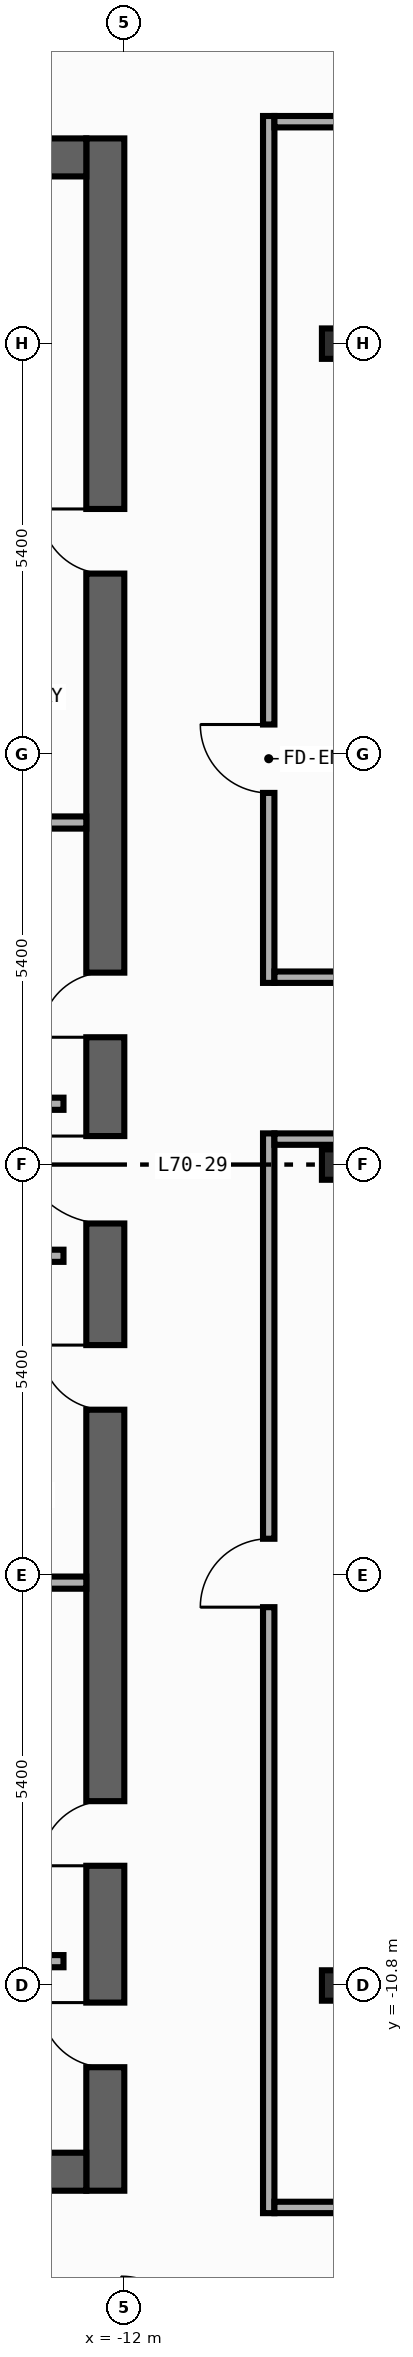
"""IFC4 building model, lengths in metres.
Left out: names, types, materials, properties, quantities, classifications, styles, units other than length and angle.
Written with IfcOpenShell. Run it as: python <this file> out.ifc"""

import sys

from ifc_helpers import new_model, si_unit, direction, frame, frame_2d, origin, origin_2d, place, context, subcontext, project, spatial, rectangle, i_section, extrude, element, fill, save


model = new_model("IFC4")
c1 = context("Model", 3, precision=1e-05, world=origin(), true_north=direction((0.0, 1.0)))
c2 = subcontext(c1, "Body", "Model", "MODEL_VIEW")
j1 = project(units=[si_unit("LENGTHUNIT", "METRE"), si_unit("PLANEANGLEUNIT", "RADIAN")], contexts=[c1])
p1 = place(None, origin())
s1 = spatial("IfcSite", under=j1, at=p1, CompositionType="ELEMENT")
p2 = place(p1, origin())
s2 = spatial("IfcBuilding", under=s1, at=p2, CompositionType="ELEMENT")
p3 = place(p2, frame((0.0, 0.0, 292.8)))
s3 = spatial("IfcBuildingStorey", under=s2, at=p3, CompositionType="ELEMENT", Elevation=292.8)
p4 = place(p3, frame((-12.25, -13.5, 0.0), z_axis=(0.0, 0.0, 1.0), x_axis=(0.0, 1.0, 0.0)))
e1 = element("IfcWall", 1, at=p4, inside=s3, PredefinedType="SHEAR", context=c2, shape_type="SweptSolid", body=[
    extrude(rectangle(XDim=27.0, YDim=0.5, at=frame_2d((13.5, 0.0))), origin(), (0.0, 0.0, 1.0), 3.54),
])
p5 = place(p4, frame((15.175, 0.0, 0.0)))
e2 = element("IfcOpeningElement", 2, at=p5, cuts=e1, PredefinedType="OPENING", context=c2, shape_type="SweptSolid", body=[
    extrude(rectangle(XDim=0.85, YDim=2.1, at=frame_2d((0.425, 1.05))), frame((0.0, 0.26, 0.0), z_axis=(0.0, -1.0, 0.0), x_axis=(1.0, 0.0, 0.0)), (0.0, 0.0, 1.0), 0.52),
])
p6 = place(p4, frame((21.275, 0.0, 0.0)))
e3 = element("IfcOpeningElement", 3, at=p6, cuts=e1, PredefinedType="OPENING", context=c2, shape_type="SweptSolid", body=[
    extrude(rectangle(XDim=0.85, YDim=2.1, at=frame_2d((0.425, 1.05))), frame((0.0, 0.26, 0.0), z_axis=(0.0, -1.0, 0.0), x_axis=(1.0, 0.0, 0.0)), (0.0, 0.0, 1.0), 0.52),
])
p7 = place(p4, frame((4.275, 0.0, 0.0)))
e4 = element("IfcOpeningElement", 4, at=p7, cuts=e1, PredefinedType="OPENING", context=c2, shape_type="SweptSolid", body=[
    extrude(rectangle(XDim=0.85, YDim=2.1, at=frame_2d((0.425, 1.05))), frame((0.0, 0.26, 0.0), z_axis=(0.0, -1.0, 0.0), x_axis=(1.0, 0.0, 0.0)), (0.0, 0.0, 1.0), 0.52),
])
p8 = place(p4, frame((10.275, 0.0, 0.0)))
e5 = element("IfcOpeningElement", 5, at=p8, cuts=e1, PredefinedType="OPENING", context=c2, shape_type="SweptSolid", body=[
    extrude(rectangle(XDim=0.85, YDim=2.1, at=frame_2d((0.425, 1.05))), frame((0.0, 0.26, 0.0), z_axis=(0.0, -1.0, 0.0), x_axis=(1.0, 0.0, 0.0)), (0.0, 0.0, 1.0), 0.52),
])
p9 = place(p4, frame((12.725, 0.0, 0.0)))
e6 = element("IfcOpeningElement", 6, at=p9, cuts=e1, PredefinedType="OPENING", context=c2, shape_type="SweptSolid", body=[
    extrude(rectangle(XDim=1.15, YDim=2.2, at=frame_2d((0.575, 1.1))), frame((0.0, 0.26, 0.0), z_axis=(0.0, -1.0, 0.0), x_axis=(1.0, 0.0, 0.0)), (0.0, 0.0, 1.0), 0.52),
])
p10 = place(p4, frame((1.625, 0.0, 0.0)))
e7 = element("IfcOpeningElement", 7, at=p10, cuts=e1, PredefinedType="OPENING", context=c2, shape_type="SweptSolid", body=[
    extrude(rectangle(XDim=0.85, YDim=2.1, at=frame_2d((0.425, 1.05))), frame((0.0, 0.26, 0.0), z_axis=(0.0, -1.0, 0.0), x_axis=(1.0, 0.0, 0.0)), (0.0, 0.0, 1.0), 0.52),
])
for number, where, z_axis, x_axis in (
    (8, (-19.9, -13.25, 0.0), (0.0, 0.0, 1.0), (1.0, 0.0, 0.0)),
    (9, (-19.9, 13.25, 0.0), (0.0, 0.0, 1.0), (1.0, 0.0, 0.0)),
):
    element("IfcWall", number, at=place(p3, frame(where, z_axis=z_axis, x_axis=x_axis)), inside=s3, PredefinedType="SHEAR", context=c2, shape_type="SweptSolid", body=[
        extrude(rectangle(XDim=7.4, YDim=0.5, at=frame_2d((3.7, 0.0))), origin(), (0.0, 0.0, 1.0), 3.54),
    ])
for number, where, z_axis, x_axis in (
    (10, (-9.2, -10.8, 0.0), (0.0, 0.0, 1.0), (1.0, 0.0, 0.0)),
    (11, (-9.2, 0.0, 0.0), (0.0, 0.0, 1.0), (1.0, 0.0, 0.0)),
    (12, (-9.2, 10.8, 0.0), (0.0, 0.0, 1.0), (1.0, 0.0, 0.0)),
):
    element("IfcColumn", number, at=place(p3, frame(where, z_axis=z_axis, x_axis=x_axis)), inside=s3, PredefinedType="COLUMN", context=c2, shape_type="SweptSolid", body=[
        extrude(i_section(OverallWidth=0.4, OverallDepth=0.4, WebThickness=0.013, FlangeThickness=0.021, FilletRadius=0.022, at=origin_2d()), origin(), (0.0, 0.0, 1.0), 3.8),
    ])
for number, where, z_axis, x_axis in (
    (13, (-15.4, 0.8, 0.0), (0.0, 0.0, 1.0), (1.0, 0.0, 0.0)),
    (14, (-15.4, -1.2, 0.0), (0.0, 0.0, 1.0), (1.0, 0.0, 0.0)),
    (15, (-15.4, -10.48, 0.0), (0.0, 0.0, 1.0), (1.0, 0.0, 0.0)),
):
    element("IfcWall", number, at=place(p3, frame(where, z_axis=z_axis, x_axis=x_axis)), inside=s3, PredefinedType="STANDARD", context=c2, shape_type="SweptSolid", body=[
        extrude(rectangle(XDim=2.6, YDim=0.16, at=frame_2d((1.3, 0.0))), origin(), (0.0, 0.0, 1.0), 3.54),
    ])
for number, where, z_axis, x_axis in (
    (16, (-15.4, 4.5, 0.0), (0.0, 0.0, 1.0), (1.0, 0.0, 0.0)),
    (17, (-15.4, -5.5, 0.0), (0.0, 0.0, 1.0), (1.0, 0.0, 0.0)),
):
    element("IfcWall", number, at=place(p3, frame(where, z_axis=z_axis, x_axis=x_axis)), inside=s3, PredefinedType="PARTITIONING", context=c2, shape_type="SweptSolid", body=[
        extrude(rectangle(XDim=2.9, YDim=0.16, at=frame_2d((1.45, 0.0))), origin(), (0.0, 0.0, 1.0), 3.54),
    ])
p11 = place(p3, frame((-10.1, 2.39, 0.0), z_axis=(0.0, 0.0, 1.0), x_axis=(0.0, 1.0, 0.0)))
e18 = element("IfcWall", 18, at=p11, inside=s3, PredefinedType="PARTITIONING", context=c2, shape_type="SweptSolid", body=[
    extrude(rectangle(XDim=11.405, YDim=0.15, at=frame_2d((5.703, 0.0))), origin(), (0.0, 0.0, 1.0), 3.54),
])
p12 = place(p11, frame((2.5, 0.0, 0.0)))
e19 = element("IfcOpeningElement", 19, at=p12, cuts=e18, PredefinedType="OPENING", context=c2, shape_type="SweptSolid", body=[
    extrude(rectangle(XDim=0.9, YDim=2.15, at=frame_2d((0.45, 1.075))), frame((0.0, 0.085, 0.0), z_axis=(0.0, -1.0, 0.0), x_axis=(1.0, 0.0, 0.0)), (0.0, 0.0, 1.0), 0.17),
])
p13 = place(p3, frame((-10.1, -13.795, 0.0), z_axis=(0.0, 0.0, 1.0), x_axis=(0.0, 1.0, 0.0)))
e20 = element("IfcWall", 20, at=p13, inside=s3, PredefinedType="PARTITIONING", context=c2, shape_type="SweptSolid", body=[
    extrude(rectangle(XDim=14.205, YDim=0.15, at=frame_2d((7.103, 0.0))), origin(), (0.0, 0.0, 1.0), 3.54),
])
p14 = place(p13, frame((7.972, 0.0, 0.0)))
e21 = element("IfcOpeningElement", 21, at=p14, cuts=e20, PredefinedType="OPENING", context=c2, shape_type="SweptSolid", body=[
    extrude(rectangle(XDim=0.9, YDim=2.15, at=frame_2d((0.45, 1.075))), frame((0.0, 0.085, 0.0), z_axis=(0.0, -1.0, 0.0), x_axis=(1.0, 0.0, 0.0)), (0.0, 0.0, 1.0), 0.17),
])
p15 = place(p3, frame((-10.025, 2.465, 0.0), z_axis=(0.0, 0.0, 1.0), x_axis=(1.0, 0.0, 0.0)))
e22 = element("IfcWall", 22, at=p15, inside=s3, PredefinedType="PARTITIONING", context=c2, shape_type="SweptSolid", body=[
    extrude(rectangle(XDim=10.855, YDim=0.15, at=frame_2d((5.427, 0.0))), origin(), (0.0, 0.0, 1.0), 3.54),
])
p16 = place(p15, frame((9.495, 0.0, 0.0)))
e23 = element("IfcOpeningElement", 23, at=p16, cuts=e22, PredefinedType="OPENING", context=c2, shape_type="SweptSolid", body=[
    extrude(rectangle(XDim=0.9, YDim=2.15, at=frame_2d((0.45, 1.075))), frame((0.0, 0.085, 0.0), z_axis=(0.0, -1.0, 0.0), x_axis=(1.0, 0.0, 0.0)), (0.0, 0.0, 1.0), 0.17),
])
p17 = place(p3, frame((-10.025, 0.335, 0.0), z_axis=(0.0, 0.0, 1.0), x_axis=(1.0, 0.0, 0.0)))
e24 = element("IfcWall", 24, at=p17, inside=s3, PredefinedType="PARTITIONING", context=c2, shape_type="SweptSolid", body=[
    extrude(rectangle(XDim=10.835, YDim=0.15, at=frame_2d((5.417, 0.0))), origin(), (0.0, 0.0, 1.0), 2.64),
])
p18 = place(p17, frame((9.475, 0.0, 0.0)))
e25 = element("IfcOpeningElement", 25, at=p18, cuts=e24, PredefinedType="OPENING", context=c2, shape_type="SweptSolid", body=[
    extrude(rectangle(XDim=0.9, YDim=2.15, at=frame_2d((0.45, 1.075))), frame((0.0, 0.085, 0.0), z_axis=(0.0, -1.0, 0.0), x_axis=(1.0, 0.0, 0.0)), (0.0, 0.0, 1.0), 0.17),
])
p19 = place(p3, frame((-10.025, 13.72, 0.0), z_axis=(0.0, 0.0, 1.0), x_axis=(1.0, 0.0, 0.0)))
e26 = element("IfcWall", 26, at=p19, inside=s3, PredefinedType="PARTITIONING", context=c2, shape_type="SweptSolid", body=[
    extrude(rectangle(XDim=10.855, YDim=0.15, at=frame_2d((5.427, 0.0))), origin(), (0.0, 0.0, 1.0), 3.54),
])
p20 = place(p19, frame((7.286, 0.0, 0.0)))
e27 = element("IfcOpeningElement", 27, at=p20, cuts=e26, PredefinedType="OPENING", context=c2, shape_type="SweptSolid", body=[
    extrude(rectangle(XDim=0.9, YDim=2.15, at=frame_2d((0.45, 1.075))), frame((0.0, 0.085, 0.0), z_axis=(0.0, -1.0, 0.0), x_axis=(1.0, 0.0, 0.0)), (0.0, 0.0, 1.0), 0.17),
])
p21 = place(p3, frame((-10.025, -13.72, 0.0), z_axis=(0.0, 0.0, 1.0), x_axis=(1.0, 0.0, 0.0)))
e28 = element("IfcWall", 28, at=p21, inside=s3, PredefinedType="PARTITIONING", context=c2, shape_type="SweptSolid", body=[
    extrude(rectangle(XDim=10.685, YDim=0.15, at=frame_2d((5.342, 0.0))), origin(), (0.0, 0.0, 1.0), 3.54),
])
p22 = place(p21, frame((7.31, 0.0, 0.0)))
e29 = element("IfcOpeningElement", 29, at=p22, cuts=e28, PredefinedType="OPENING", context=c2, shape_type="SweptSolid", body=[
    extrude(rectangle(XDim=0.9, YDim=2.15, at=frame_2d((0.45, 1.075))), frame((0.0, 0.085, 0.0), z_axis=(0.0, -1.0, 0.0), x_axis=(1.0, 0.0, 0.0)), (0.0, 0.0, 1.0), 0.17),
])
p23 = place(p5, origin())
e30 = element("IfcDoor", 30, at=p23, inside=s3, OperationType="SINGLE_SWING_LEFT", PredefinedType="DOOR", context=c2, shape_type="SweptSolid", body=[
    extrude(rectangle(XDim=0.85, YDim=2.1, at=frame_2d((0.425, 1.05))), frame((0.0, 0.025, 0.0), z_axis=(0.0, -1.0, 0.0), x_axis=(1.0, 0.0, 0.0)), (0.0, 0.0, 1.0), 0.05),
])
fill(e2, e30)
p24 = place(p6, origin())
e31 = element("IfcDoor", 31, at=p24, inside=s3, OperationType="SINGLE_SWING_RIGHT", PredefinedType="DOOR", context=c2, shape_type="SweptSolid", body=[
    extrude(rectangle(XDim=0.85, YDim=2.1, at=frame_2d((0.425, 1.05))), frame((0.0, 0.025, 0.0), z_axis=(0.0, -1.0, 0.0), x_axis=(1.0, 0.0, 0.0)), (0.0, 0.0, 1.0), 0.05),
])
fill(e3, e31)
p25 = place(p7, origin())
e32 = element("IfcDoor", 32, at=p25, inside=s3, OperationType="SINGLE_SWING_LEFT", PredefinedType="DOOR", context=c2, shape_type="SweptSolid", body=[
    extrude(rectangle(XDim=0.85, YDim=2.1, at=frame_2d((0.425, 1.05))), frame((0.0, 0.025, 0.0), z_axis=(0.0, -1.0, 0.0), x_axis=(1.0, 0.0, 0.0)), (0.0, 0.0, 1.0), 0.05),
])
fill(e4, e32)
p26 = place(p8, origin())
e33 = element("IfcDoor", 33, at=p26, inside=s3, OperationType="SINGLE_SWING_RIGHT", PredefinedType="DOOR", context=c2, shape_type="SweptSolid", body=[
    extrude(rectangle(XDim=0.85, YDim=2.1, at=frame_2d((0.425, 1.05))), frame((0.0, 0.025, 0.0), z_axis=(0.0, -1.0, 0.0), x_axis=(1.0, 0.0, 0.0)), (0.0, 0.0, 1.0), 0.05),
])
fill(e5, e33)
p27 = place(p9, origin())
e34 = element("IfcDoor", 34, at=p27, inside=s3, OperationType="SINGLE_SWING_RIGHT", PredefinedType="DOOR", context=c2, shape_type="SweptSolid", body=[
    extrude(rectangle(XDim=1.15, YDim=2.2, at=frame_2d((0.575, 1.1))), frame((0.0, 0.025, 0.0), z_axis=(0.0, -1.0, 0.0), x_axis=(1.0, 0.0, 0.0)), (0.0, 0.0, 1.0), 0.05),
])
fill(e6, e34)
p28 = place(p10, origin())
e35 = element("IfcDoor", 35, at=p28, inside=s3, OperationType="SINGLE_SWING_RIGHT", PredefinedType="DOOR", context=c2, shape_type="SweptSolid", body=[
    extrude(rectangle(XDim=0.85, YDim=2.1, at=frame_2d((0.425, 1.05))), frame((0.0, 0.025, 0.0), z_axis=(0.0, -1.0, 0.0), x_axis=(1.0, 0.0, 0.0)), (0.0, 0.0, 1.0), 0.05),
])
fill(e7, e35)
p29 = place(p12, origin())
e36 = element("IfcDoor", 36, at=p29, inside=s3, OperationType="SINGLE_SWING_RIGHT", PredefinedType="DOOR", context=c2, shape_type="SweptSolid", body=[
    extrude(rectangle(XDim=0.9, YDim=2.15, at=frame_2d((0.45, 1.075))), frame((0.0, 0.025, 0.0), z_axis=(0.0, -1.0, 0.0), x_axis=(1.0, 0.0, 0.0)), (0.0, 0.0, 1.0), 0.05),
])
fill(e19, e36)
p30 = place(p14, origin())
e37 = element("IfcDoor", 37, at=p30, inside=s3, OperationType="SINGLE_SWING_LEFT", PredefinedType="DOOR", context=c2, shape_type="SweptSolid", body=[
    extrude(rectangle(XDim=0.9, YDim=2.15, at=frame_2d((0.45, 1.075))), frame((0.0, 0.025, 0.0), z_axis=(0.0, -1.0, 0.0), x_axis=(1.0, 0.0, 0.0)), (0.0, 0.0, 1.0), 0.05),
])
fill(e21, e37)
save(model, sys.argv[1])
